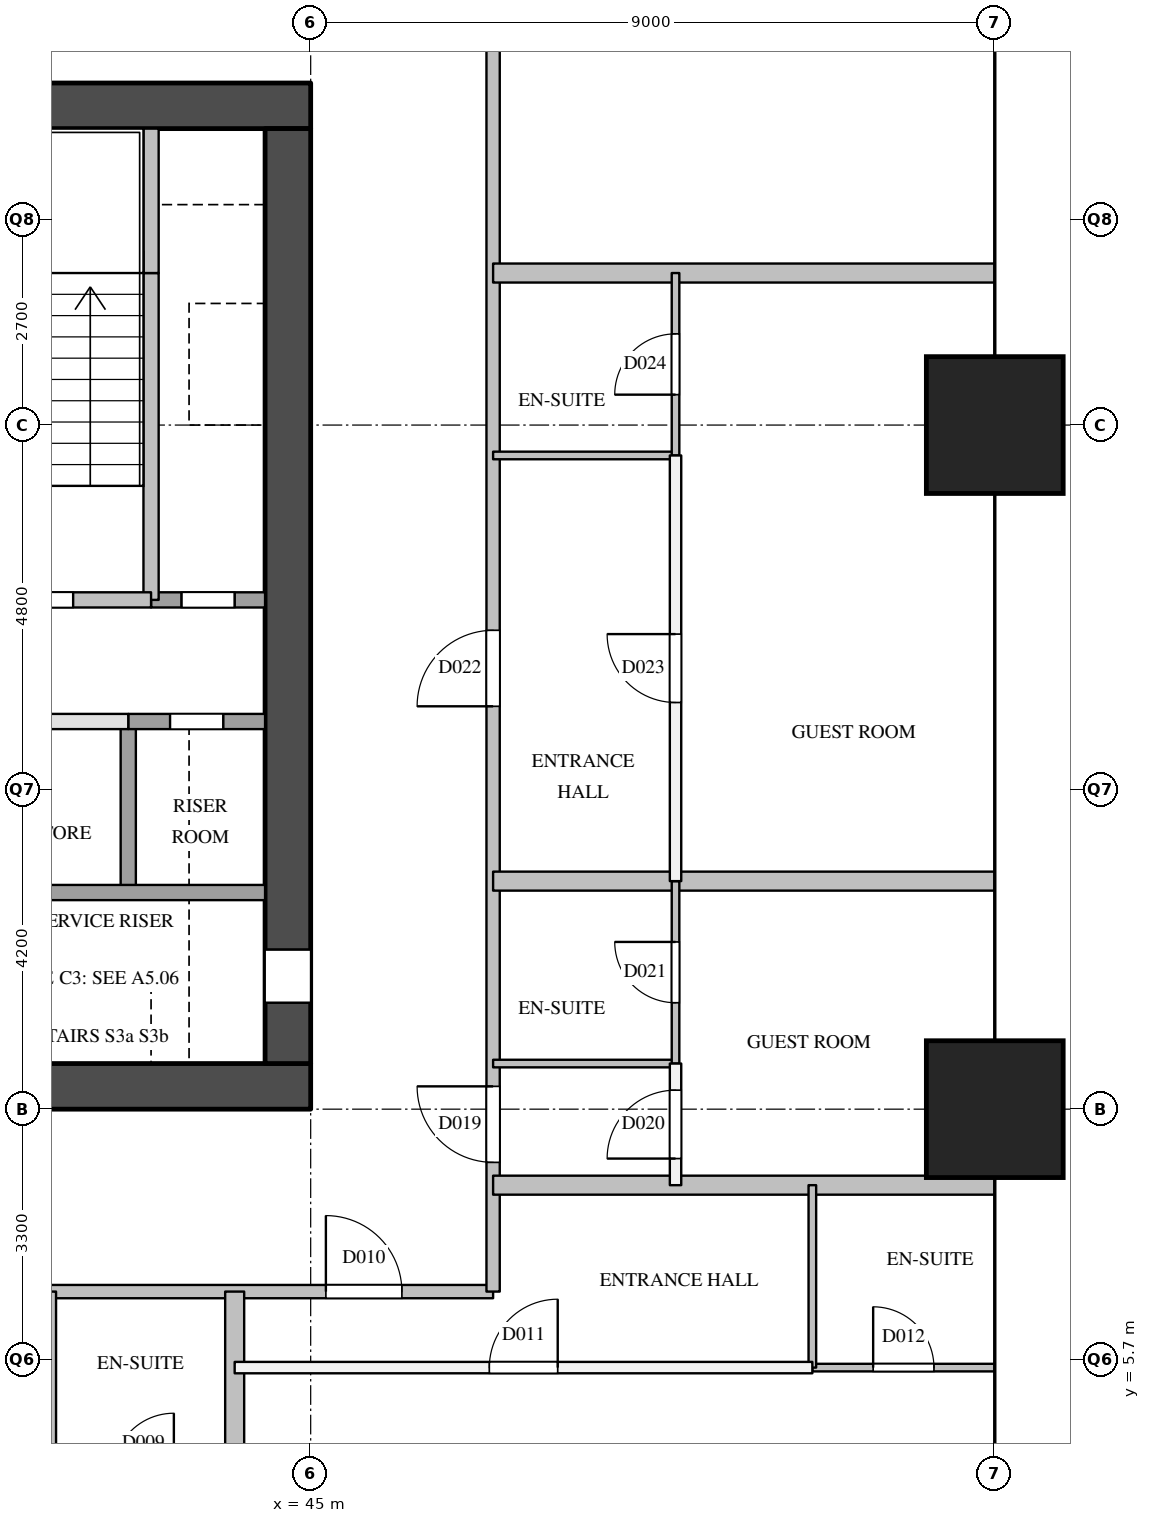
"""IFC4 building model, lengths in metres.
Left out: names, types, materials, properties, quantities, classifications, styles, units other than length and angle.
Written with IfcOpenShell. Run it as: python <this file> out.ifc"""

import sys

from ifc_helpers import new_model, si_unit, direction, frame, frame_2d, origin, origin_2d, place, context, subcontext, project, spatial, rectangle, extrude, element, fill, save


model = new_model("IFC4")
c1 = context("Model", 3, precision=1e-05, world=origin(), true_north=direction((0.0, 1.0)))
c2 = subcontext(c1, "Body", "Model", "MODEL_VIEW")
j1 = project(units=[si_unit("LENGTHUNIT", "METRE"), si_unit("PLANEANGLEUNIT", "RADIAN")], contexts=[c1])
p1 = place(None, origin())
s1 = spatial("IfcSite", under=j1, at=p1, CompositionType="ELEMENT")
p2 = place(p1, origin())
s2 = spatial("IfcBuilding", under=s1, at=p2, CompositionType="ELEMENT")
p3 = place(p2, frame((0.0, 0.0, 38.6)))
s3 = spatial("IfcBuildingStorey", under=s2, at=p3, CompositionType="ELEMENT", Elevation=38.6)
for number, where, z_axis, x_axis in (
    (1, (54.0, 9.0, 0.0), (0.0, 0.0, 1.0), (1.0, 0.0, 0.0)),
    (2, (54.0, 18.0, 0.0), (0.0, 0.0, 1.0), (1.0, 0.0, 0.0)),
):
    element("IfcColumn", number, at=place(p3, frame(where, z_axis=z_axis, x_axis=x_axis)), inside=s3, PredefinedType="COLUMN", context=c2, shape_type="SweptSolid", body=[
        extrude(rectangle(XDim=1.8, YDim=1.8, at=origin_2d()), origin(), (0.0, 0.0, 1.0), 3.8),
    ])
for number, where, z_axis, x_axis in (
    (3, (36.0, 9.3, 0.0), (0.0, 0.0, 1.0), (1.0, 0.0, 0.0)),
    (4, (36.0, 22.2, 0.0), (0.0, 0.0, 1.0), (1.0, 0.0, 0.0)),
):
    element("IfcWall", number, at=place(p3, frame(where, z_axis=z_axis, x_axis=x_axis)), inside=s3, PredefinedType="SHEAR", context=c2, shape_type="SweptSolid", body=[
        extrude(rectangle(XDim=9.0, YDim=0.6, at=frame_2d((4.5, 0.0))), origin(), (0.0, 0.0, 1.0), 3.5),
    ])
p4 = place(p3, frame((44.7, 9.6, 0.0), z_axis=(0.0, 0.0, 1.0), x_axis=(0.0, 1.0, 0.0)))
e5 = element("IfcWall", 5, at=p4, inside=s3, PredefinedType="SHEAR", context=c2, shape_type="SweptSolid", body=[
    extrude(rectangle(XDim=12.3, YDim=0.6, at=frame_2d((6.15, 0.0))), origin(), (0.0, 0.0, 1.0), 3.5),
])
p5 = place(p4, frame((0.8, 0.0, 0.0)))
e6 = element("IfcOpeningElement", 6, at=p5, cuts=e5, PredefinedType="OPENING", context=c2, shape_type="SweptSolid", body=[
    extrude(rectangle(XDim=0.7, YDim=2.1, at=frame_2d((0.35, 1.05))), frame((0.0, 0.31, 0.0), z_axis=(0.0, -1.0, 0.0), x_axis=(1.0, 0.0, 0.0)), (0.0, 0.0, 1.0), 0.62),
])
p6 = place(p3, frame((42.6, 11.9, 0.0), z_axis=(0.0, 0.0, 1.0), x_axis=(0.0, 1.0, 0.0)))
e7 = element("IfcWall", 7, at=p6, inside=s3, PredefinedType="SOLIDWALL", context=c2, shape_type="SweptSolid", body=[
    extrude(rectangle(XDim=2.2, YDim=0.2, at=frame_2d((1.1, 0.0))), origin(), (0.0, 0.0, 1.0), 3.5),
])
p7 = place(p3, frame((42.9, 15.7, 0.0), z_axis=(0.0, 0.0, 1.0), x_axis=(0.0, 1.0, 0.0)))
e8 = element("IfcWall", 8, at=p7, inside=s3, PredefinedType="SOLIDWALL", context=c2, shape_type="SweptSolid", body=[
    extrude(rectangle(XDim=4.3, YDim=0.2, at=frame_2d((2.15, 0.0))), origin(), (0.0, 0.0, 1.0), 3.5),
])
p8 = place(p3, frame((42.9, 20.0, 0.0), z_axis=(0.0, 0.0, 1.0), x_axis=(0.0, 1.0, 0.0)))
e9 = element("IfcWall", 9, at=p8, inside=s3, PredefinedType="SOLIDWALL", context=c2, shape_type="SweptSolid", body=[
    extrude(rectangle(XDim=1.9, YDim=0.2, at=frame_2d((0.95, 0.0))), origin(), (0.0, 0.0, 1.0), 3.5),
])
p9 = place(p3, frame((36.6, 11.85, 0.0), z_axis=(0.0, 0.0, 1.0), x_axis=(1.0, 0.0, 0.0)))
e10 = element("IfcWall", 10, at=p9, inside=s3, PredefinedType="SOLIDWALL", context=c2, shape_type="SweptSolid", body=[
    extrude(rectangle(XDim=7.8, YDim=0.2, at=frame_2d((3.9, 0.0))), origin(), (0.0, 0.0, 1.0), 3.5),
])
p10 = place(p3, frame((36.6, 14.1, 0.0), z_axis=(0.0, 0.0, 1.0), x_axis=(1.0, 0.0, 0.0)))
e11 = element("IfcWall", 11, at=p10, inside=s3, PredefinedType="PARTITIONING", context=c2, shape_type="SweptSolid", body=[
    extrude(rectangle(XDim=6.0, YDim=0.2, at=frame_2d((3.0, 0.0))), origin(), (0.0, 0.0, 1.0), 3.5),
])
p11 = place(p10, frame((0.9, 0.0, 0.0)))
e12 = element("IfcOpeningElement", 12, at=p11, cuts=e11, PredefinedType="OPENING", context=c2, shape_type="SweptSolid", body=[
    extrude(rectangle(XDim=0.9, YDim=2.1, at=frame_2d((0.45, 1.05))), frame((0.0, 0.11, 0.0), z_axis=(0.0, -1.0, 0.0), x_axis=(1.0, 0.0, 0.0)), (0.0, 0.0, 1.0), 0.22),
])
p12 = place(p10, frame((3.9, 0.0, 0.0)))
e13 = element("IfcOpeningElement", 13, at=p12, cuts=e11, PredefinedType="OPENING", context=c2, shape_type="SweptSolid", body=[
    extrude(rectangle(XDim=0.9, YDim=2.1, at=frame_2d((0.45, 1.05))), frame((0.0, 0.11, 0.0), z_axis=(0.0, -1.0, 0.0), x_axis=(1.0, 0.0, 0.0)), (0.0, 0.0, 1.0), 0.22),
])
p13 = place(p3, frame((42.6, 14.1, 0.0), z_axis=(0.0, 0.0, 1.0), x_axis=(1.0, 0.0, 0.0)))
e14 = element("IfcWall", 14, at=p13, inside=s3, PredefinedType="SOLIDWALL", context=c2, shape_type="SweptSolid", body=[
    extrude(rectangle(XDim=1.8, YDim=0.2, at=frame_2d((0.9, 0.0))), origin(), (0.0, 0.0, 1.0), 3.5),
])
p14 = place(p13, frame((0.55, 0.0, 0.0)))
e15 = element("IfcOpeningElement", 15, at=p14, cuts=e14, PredefinedType="OPENING", context=c2, shape_type="SweptSolid", body=[
    extrude(rectangle(XDim=0.7, YDim=2.1, at=frame_2d((0.35, 1.05))), frame((0.0, 0.11, 0.0), z_axis=(0.0, -1.0, 0.0), x_axis=(1.0, 0.0, 0.0)), (0.0, 0.0, 1.0), 0.22),
])
p15 = place(p3, frame((42.9, 15.7, 0.0), z_axis=(0.0, 0.0, 1.0), x_axis=(1.0, 0.0, 0.0)))
e16 = element("IfcWall", 16, at=p15, inside=s3, PredefinedType="SOLIDWALL", context=c2, shape_type="SweptSolid", body=[
    extrude(rectangle(XDim=1.5, YDim=0.2, at=frame_2d((0.75, 0.0))), origin(), (0.0, 0.0, 1.0), 3.5),
])
p16 = place(p15, frame((0.4, 0.0, 0.0)))
e17 = element("IfcOpeningElement", 17, at=p16, cuts=e16, PredefinedType="OPENING", context=c2, shape_type="SweptSolid", body=[
    extrude(rectangle(XDim=0.7, YDim=2.1, at=frame_2d((0.35, 1.05))), frame((0.0, 0.11, 0.0), z_axis=(0.0, -1.0, 0.0), x_axis=(1.0, 0.0, 0.0)), (0.0, 0.0, 1.0), 0.22),
])
p17 = place(p3, frame((36.6, 15.7, 0.0), z_axis=(0.0, 0.0, 1.0), x_axis=(1.0, 0.0, 0.0)))
e18 = element("IfcWall", 18, at=p17, inside=s3, PredefinedType="SOLIDWALL", context=c2, shape_type="SweptSolid", body=[
    extrude(rectangle(XDim=6.3, YDim=0.2, at=frame_2d((3.15, 0.0))), origin(), (0.0, 0.0, 1.0), 3.5),
])
p18 = place(p17, frame((1.025, 0.0, 0.0)))
e19 = element("IfcOpeningElement", 19, at=p18, cuts=e18, PredefinedType="OPENING", context=c2, shape_type="SweptSolid", body=[
    extrude(rectangle(XDim=1.1, YDim=2.1, at=frame_2d((0.55, 1.05))), frame((0.0, 0.11, 0.0), z_axis=(0.0, -1.0, 0.0), x_axis=(1.0, 0.0, 0.0)), (0.0, 0.0, 1.0), 0.22),
])
p19 = place(p17, frame((4.175, 0.0, 0.0)))
e20 = element("IfcOpeningElement", 20, at=p19, cuts=e18, PredefinedType="OPENING", context=c2, shape_type="SweptSolid", body=[
    extrude(rectangle(XDim=1.1, YDim=2.1, at=frame_2d((0.55, 1.05))), frame((0.0, 0.11, 0.0), z_axis=(0.0, -1.0, 0.0), x_axis=(1.0, 0.0, 0.0)), (0.0, 0.0, 1.0), 0.22),
])
p20 = place(p3, frame((33.6, 6.6, 0.0), z_axis=(0.0, 0.0, 1.0), x_axis=(1.0, 0.0, 0.0)))
e21 = element("IfcWall", 21, at=p20, inside=s3, PredefinedType="PARTITIONING", context=c2, shape_type="SweptSolid", body=[
    extrude(rectangle(XDim=13.8, YDim=0.175, at=frame_2d((6.9, 0.0))), origin(), (0.0, 0.0, 1.0), 3.5),
])
p21 = place(p20, frame((4.7, 0.0, 0.0)))
e22 = element("IfcOpeningElement", 22, at=p21, cuts=e21, PredefinedType="OPENING", context=c2, shape_type="SweptSolid", body=[
    extrude(rectangle(XDim=1.0, YDim=2.1, at=frame_2d((0.5, 1.05))), frame((0.0, 0.097, 0.0), z_axis=(0.0, -1.0, 0.0), x_axis=(1.0, 0.0, 0.0)), (0.0, 0.0, 1.0), 0.195),
])
p22 = place(p20, frame((11.6, 0.0, 0.0)))
e23 = element("IfcOpeningElement", 23, at=p22, cuts=e21, PredefinedType="OPENING", context=c2, shape_type="SweptSolid", body=[
    extrude(rectangle(XDim=1.0, YDim=2.1, at=frame_2d((0.5, 1.05))), frame((0.0, 0.097, 0.0), z_axis=(0.0, -1.0, 0.0), x_axis=(1.0, 0.0, 0.0)), (0.0, 0.0, 1.0), 0.195),
])
p23 = place(p3, frame((47.4, 6.6, 0.0), z_axis=(0.0, 0.0, 1.0), x_axis=(0.0, 1.0, 0.0)))
e24 = element("IfcWall", 24, at=p23, inside=s3, PredefinedType="PARTITIONING", context=c2, shape_type="SweptSolid", body=[
    extrude(rectangle(XDim=18.3, YDim=0.175, at=frame_2d((9.15, 0.0))), origin(), (0.0, 0.0, 1.0), 3.5),
])
p24 = place(p23, frame((1.7, 0.0, 0.0)))
e25 = element("IfcOpeningElement", 25, at=p24, cuts=e24, PredefinedType="OPENING", context=c2, shape_type="SweptSolid", body=[
    extrude(rectangle(XDim=1.0, YDim=2.1, at=frame_2d((0.5, 1.05))), frame((0.0, 0.097, 0.0), z_axis=(0.0, -1.0, 0.0), x_axis=(1.0, 0.0, 0.0)), (0.0, 0.0, 1.0), 0.195),
])
p25 = place(p23, frame((7.7, 0.0, 0.0)))
e26 = element("IfcOpeningElement", 26, at=p25, cuts=e24, PredefinedType="OPENING", context=c2, shape_type="SweptSolid", body=[
    extrude(rectangle(XDim=1.0, YDim=2.1, at=frame_2d((0.5, 1.05))), frame((0.0, 0.097, 0.0), z_axis=(0.0, -1.0, 0.0), x_axis=(1.0, 0.0, 0.0)), (0.0, 0.0, 1.0), 0.195),
])
p26 = place(p3, frame((44.0, 5.6, 0.0), z_axis=(0.0, 0.0, 1.0), x_axis=(1.0, 0.0, 0.0)))
e27 = element("IfcWall", 27, at=p26, inside=s3, PredefinedType="PARTITIONING", context=c2, shape_type="SweptSolid", body=[
    extrude(rectangle(XDim=7.6, YDim=0.15, at=frame_2d((3.8, 0.0))), origin(), (0.0, 0.0, 1.0), 3.5),
])
p27 = place(p26, frame((3.35, 0.0, 0.0)))
e28 = element("IfcOpeningElement", 28, at=p27, cuts=e27, PredefinedType="OPENING", context=c2, shape_type="SweptSolid", body=[
    extrude(rectangle(XDim=0.9, YDim=2.1, at=frame_2d((0.45, 1.05))), frame((0.0, 0.085, 0.0), z_axis=(0.0, -1.0, 0.0), x_axis=(1.0, 0.0, 0.0)), (0.0, 0.0, 1.0), 0.17),
])
p28 = place(p3, frame((49.8, 8.0, 0.0), z_axis=(0.0, 0.0, 1.0), x_axis=(0.0, 1.0, 0.0)))
e29 = element("IfcWall", 29, at=p28, inside=s3, PredefinedType="PARTITIONING", context=c2, shape_type="SweptSolid", body=[
    extrude(rectangle(XDim=1.6, YDim=0.15, at=frame_2d((0.8, 0.0))), origin(), (0.0, 0.0, 1.0), 3.5),
])
p29 = place(p28, frame((0.35, 0.0, 0.0)))
e30 = element("IfcOpeningElement", 30, at=p29, cuts=e29, PredefinedType="OPENING", context=c2, shape_type="SweptSolid", body=[
    extrude(rectangle(XDim=0.9, YDim=2.1, at=frame_2d((0.45, 1.05))), frame((0.0, 0.085, 0.0), z_axis=(0.0, -1.0, 0.0), x_axis=(1.0, 0.0, 0.0)), (0.0, 0.0, 1.0), 0.17),
])
p30 = place(p3, frame((49.8, 12.0, 0.0), z_axis=(0.0, 0.0, 1.0), x_axis=(0.0, 1.0, 0.0)))
e31 = element("IfcWall", 31, at=p30, inside=s3, PredefinedType="PARTITIONING", context=c2, shape_type="SweptSolid", body=[
    extrude(rectangle(XDim=5.6, YDim=0.15, at=frame_2d((2.8, 0.0))), origin(), (0.0, 0.0, 1.0), 3.5),
])
p31 = place(p30, frame((2.35, 0.0, 0.0)))
e32 = element("IfcOpeningElement", 32, at=p31, cuts=e31, PredefinedType="OPENING", context=c2, shape_type="SweptSolid", body=[
    extrude(rectangle(XDim=0.9, YDim=2.1, at=frame_2d((0.45, 1.05))), frame((0.0, 0.085, 0.0), z_axis=(0.0, -1.0, 0.0), x_axis=(1.0, 0.0, 0.0)), (0.0, 0.0, 1.0), 0.17),
])
for number, where, z_axis, x_axis in (
    (33, (47.4, 8.0, 0.0), (0.0, 0.0, 1.0), (1.0, 0.0, 0.0)),
    (34, (47.4, 12.0, 0.0), (0.0, 0.0, 1.0), (1.0, 0.0, 0.0)),
    (35, (47.4, 20.0, 0.0), (0.0, 0.0, 1.0), (1.0, 0.0, 0.0)),
    (36, (44.0, 0.0, 0.0), (0.0, 0.0, 1.0), (0.0, 1.0, 0.0)),
):
    element("IfcWall", number, at=place(p3, frame(where, z_axis=z_axis, x_axis=x_axis)), inside=s3, PredefinedType="PARTITIONING", context=c2, shape_type="SweptSolid", body=[
        extrude(rectangle(XDim=6.6, YDim=0.25, at=frame_2d((3.3, 0.0))), origin(), (0.0, 0.0, 1.0), 2.5),
    ])
p32 = place(p3, frame((51.6, 5.6, 0.0), z_axis=(0.0, 0.0, 1.0), x_axis=(1.0, 0.0, 0.0)))
e37 = element("IfcWall", 37, at=p32, inside=s3, PredefinedType="PARTITIONING", context=c2, shape_type="SweptSolid", body=[
    extrude(rectangle(XDim=2.4, YDim=0.1, at=frame_2d((1.2, 0.0))), origin(), (0.0, 0.0, 1.0), 2.5),
])
p33 = place(p32, frame((0.8, 0.0, 0.0)))
e38 = element("IfcOpeningElement", 38, at=p33, cuts=e37, PredefinedType="OPENING", context=c2, shape_type="SweptSolid", body=[
    extrude(rectangle(XDim=0.8, YDim=2.1, at=frame_2d((0.4, 1.05))), frame((0.0, 0.06, 0.0), z_axis=(0.0, -1.0, 0.0), x_axis=(1.0, 0.0, 0.0)), (0.0, 0.0, 1.0), 0.12),
])
for number, where, z_axis, x_axis in (
    (39, (47.4, 9.6, 0.0), (0.0, 0.0, 1.0), (1.0, 0.0, 0.0)),
    (40, (47.4, 17.6, 0.0), (0.0, 0.0, 1.0), (1.0, 0.0, 0.0)),
    (41, (41.6, 4.2, 0.0), (0.0, 0.0, 1.0), (0.0, 1.0, 0.0)),
):
    element("IfcWall", number, at=place(p3, frame(where, z_axis=z_axis, x_axis=x_axis)), inside=s3, PredefinedType="PARTITIONING", context=c2, shape_type="SweptSolid", body=[
        extrude(rectangle(XDim=2.4, YDim=0.1, at=frame_2d((1.2, 0.0))), origin(), (0.0, 0.0, 1.0), 3.5),
    ])
p34 = place(p3, frame((49.8, 9.6, 0.0), z_axis=(0.0, 0.0, 1.0), x_axis=(0.0, 1.0, 0.0)))
e42 = element("IfcWall", 42, at=p34, inside=s3, PredefinedType="PARTITIONING", context=c2, shape_type="SweptSolid", body=[
    extrude(rectangle(XDim=2.4, YDim=0.1, at=frame_2d((1.2, 0.0))), origin(), (0.0, 0.0, 1.0), 3.5),
])
p35 = place(p34, frame((0.8, 0.0, 0.0)))
e43 = element("IfcOpeningElement", 43, at=p35, cuts=e42, PredefinedType="OPENING", context=c2, shape_type="SweptSolid", body=[
    extrude(rectangle(XDim=0.8, YDim=2.1, at=frame_2d((0.4, 1.05))), frame((0.0, 0.06, 0.0), z_axis=(0.0, -1.0, 0.0), x_axis=(1.0, 0.0, 0.0)), (0.0, 0.0, 1.0), 0.12),
])
p36 = place(p3, frame((49.8, 17.6, 0.0), z_axis=(0.0, 0.0, 1.0), x_axis=(0.0, 1.0, 0.0)))
e44 = element("IfcWall", 44, at=p36, inside=s3, PredefinedType="PARTITIONING", context=c2, shape_type="SweptSolid", body=[
    extrude(rectangle(XDim=2.4, YDim=0.1, at=frame_2d((1.2, 0.0))), origin(), (0.0, 0.0, 1.0), 3.5),
])
p37 = place(p36, frame((0.8, 0.0, 0.0)))
e45 = element("IfcOpeningElement", 45, at=p37, cuts=e44, PredefinedType="OPENING", context=c2, shape_type="SweptSolid", body=[
    extrude(rectangle(XDim=0.8, YDim=2.1, at=frame_2d((0.4, 1.05))), frame((0.0, 0.06, 0.0), z_axis=(0.0, -1.0, 0.0), x_axis=(1.0, 0.0, 0.0)), (0.0, 0.0, 1.0), 0.12),
])
p38 = place(p3, frame((51.6, 5.6, 0.0), z_axis=(0.0, 0.0, 1.0), x_axis=(0.0, 1.0, 0.0)))
e46 = element("IfcWall", 46, at=p38, inside=s3, PredefinedType="PARTITIONING", context=c2, shape_type="SweptSolid", body=[
    extrude(rectangle(XDim=2.4, YDim=0.1, at=frame_2d((1.2, 0.0))), origin(), (0.0, 0.0, 1.0), 3.5),
])
p39 = place(p19, origin())
e47 = element("IfcDoor", 47, at=p39, inside=s3, OperationType="SINGLE_SWING_RIGHT", PredefinedType="DOOR", context=c2, shape_type="SweptSolid", body=[
    extrude(rectangle(XDim=1.1, YDim=2.1, at=frame_2d((0.55, 1.05))), frame((0.0, 0.025, 0.0), z_axis=(0.0, -1.0, 0.0), x_axis=(1.0, 0.0, 0.0)), (0.0, 0.0, 1.0), 0.05),
])
fill(e20, e47)
p40 = place(p16, origin())
e48 = element("IfcDoor", 48, at=p40, inside=s3, OperationType="SINGLE_SWING_LEFT", PredefinedType="DOOR", context=c2, shape_type="SweptSolid", body=[
    extrude(rectangle(XDim=0.7, YDim=2.1, at=frame_2d((0.35, 1.05))), frame((0.0, 0.025, 0.0), z_axis=(0.0, -1.0, 0.0), x_axis=(1.0, 0.0, 0.0)), (0.0, 0.0, 1.0), 0.05),
])
fill(e17, e48)
p41 = place(p14, origin())
e49 = element("IfcDoor", 49, at=p41, inside=s3, OperationType="SINGLE_SWING_RIGHT", PredefinedType="DOOR", context=c2, shape_type="SweptSolid", body=[
    extrude(rectangle(XDim=0.7, YDim=2.1, at=frame_2d((0.35, 1.05))), frame((0.0, 0.025, 0.0), z_axis=(0.0, -1.0, 0.0), x_axis=(1.0, 0.0, 0.0)), (0.0, 0.0, 1.0), 0.05),
])
fill(e15, e49)
p42 = place(p5, origin())
e50 = element("IfcDoor", 50, at=p42, inside=s3, OperationType="SINGLE_SWING_LEFT", PredefinedType="DOOR", context=c2, shape_type="SweptSolid", body=[
    extrude(rectangle(XDim=0.7, YDim=2.1, at=frame_2d((0.35, 1.05))), frame((0.0, 0.025, 0.0), z_axis=(0.0, -1.0, 0.0), x_axis=(1.0, 0.0, 0.0)), (0.0, 0.0, 1.0), 0.05),
])
fill(e6, e50)
p43 = place(p22, origin())
e51 = element("IfcDoor", 51, at=p43, inside=s3, OperationType="SINGLE_SWING_LEFT", PredefinedType="DOOR", context=c2, shape_type="SweptSolid", body=[
    extrude(rectangle(XDim=1.0, YDim=2.1, at=frame_2d((0.5, 1.05))), frame((0.0, 0.025, 0.0), z_axis=(0.0, -1.0, 0.0), x_axis=(1.0, 0.0, 0.0)), (0.0, 0.0, 1.0), 0.05),
])
fill(e23, e51)
p44 = place(p27, origin())
e52 = element("IfcDoor", 52, at=p44, inside=s3, OperationType="SINGLE_SWING_RIGHT", PredefinedType="DOOR", context=c2, shape_type="SweptSolid", body=[
    extrude(rectangle(XDim=0.9, YDim=2.1, at=frame_2d((0.45, 1.05))), frame((0.0, 0.025, 0.0), z_axis=(0.0, -1.0, 0.0), x_axis=(1.0, 0.0, 0.0)), (0.0, 0.0, 1.0), 0.05),
])
fill(e28, e52)
p45 = place(p33, origin())
e53 = element("IfcDoor", 53, at=p45, inside=s3, OperationType="SINGLE_SWING_LEFT", PredefinedType="DOOR", context=c2, shape_type="SweptSolid", body=[
    extrude(rectangle(XDim=0.8, YDim=2.1, at=frame_2d((0.4, 1.05))), frame((0.0, 0.025, 0.0), z_axis=(0.0, -1.0, 0.0), x_axis=(1.0, 0.0, 0.0)), (0.0, 0.0, 1.0), 0.05),
])
fill(e38, e53)
p46 = place(p24, origin())
e54 = element("IfcDoor", 54, at=p46, inside=s3, OperationType="SINGLE_SWING_RIGHT", PredefinedType="DOOR", context=c2, shape_type="SweptSolid", body=[
    extrude(rectangle(XDim=1.0, YDim=2.1, at=frame_2d((0.5, 1.05))), frame((0.0, 0.025, 0.0), z_axis=(0.0, -1.0, 0.0), x_axis=(1.0, 0.0, 0.0)), (0.0, 0.0, 1.0), 0.05),
])
fill(e25, e54)
p47 = place(p29, origin())
e55 = element("IfcDoor", 55, at=p47, inside=s3, OperationType="SINGLE_SWING_LEFT", PredefinedType="DOOR", context=c2, shape_type="SweptSolid", body=[
    extrude(rectangle(XDim=0.9, YDim=2.1, at=frame_2d((0.45, 1.05))), frame((0.0, 0.025, 0.0), z_axis=(0.0, -1.0, 0.0), x_axis=(1.0, 0.0, 0.0)), (0.0, 0.0, 1.0), 0.05),
])
fill(e30, e55)
p48 = place(p35, origin())
e56 = element("IfcDoor", 56, at=p48, inside=s3, OperationType="SINGLE_SWING_RIGHT", PredefinedType="DOOR", context=c2, shape_type="SweptSolid", body=[
    extrude(rectangle(XDim=0.8, YDim=2.1, at=frame_2d((0.4, 1.05))), frame((0.0, 0.025, 0.0), z_axis=(0.0, -1.0, 0.0), x_axis=(1.0, 0.0, 0.0)), (0.0, 0.0, 1.0), 0.05),
])
fill(e43, e56)
p49 = place(p25, origin())
e57 = element("IfcDoor", 57, at=p49, inside=s3, OperationType="SINGLE_SWING_LEFT", PredefinedType="DOOR", context=c2, shape_type="SweptSolid", body=[
    extrude(rectangle(XDim=1.0, YDim=2.1, at=frame_2d((0.5, 1.05))), frame((0.0, 0.025, 0.0), z_axis=(0.0, -1.0, 0.0), x_axis=(1.0, 0.0, 0.0)), (0.0, 0.0, 1.0), 0.05),
])
fill(e26, e57)
p50 = place(p31, origin())
e58 = element("IfcDoor", 58, at=p50, inside=s3, OperationType="SINGLE_SWING_RIGHT", PredefinedType="DOOR", context=c2, shape_type="SweptSolid", body=[
    extrude(rectangle(XDim=0.9, YDim=2.1, at=frame_2d((0.45, 1.05))), frame((0.0, 0.025, 0.0), z_axis=(0.0, -1.0, 0.0), x_axis=(1.0, 0.0, 0.0)), (0.0, 0.0, 1.0), 0.05),
])
fill(e32, e58)
p51 = place(p37, origin())
e59 = element("IfcDoor", 59, at=p51, inside=s3, OperationType="SINGLE_SWING_LEFT", PredefinedType="DOOR", context=c2, shape_type="SweptSolid", body=[
    extrude(rectangle(XDim=0.8, YDim=2.1, at=frame_2d((0.4, 1.05))), frame((0.0, 0.025, 0.0), z_axis=(0.0, -1.0, 0.0), x_axis=(1.0, 0.0, 0.0)), (0.0, 0.0, 1.0), 0.05),
])
fill(e45, e59)
save(model, sys.argv[1])
